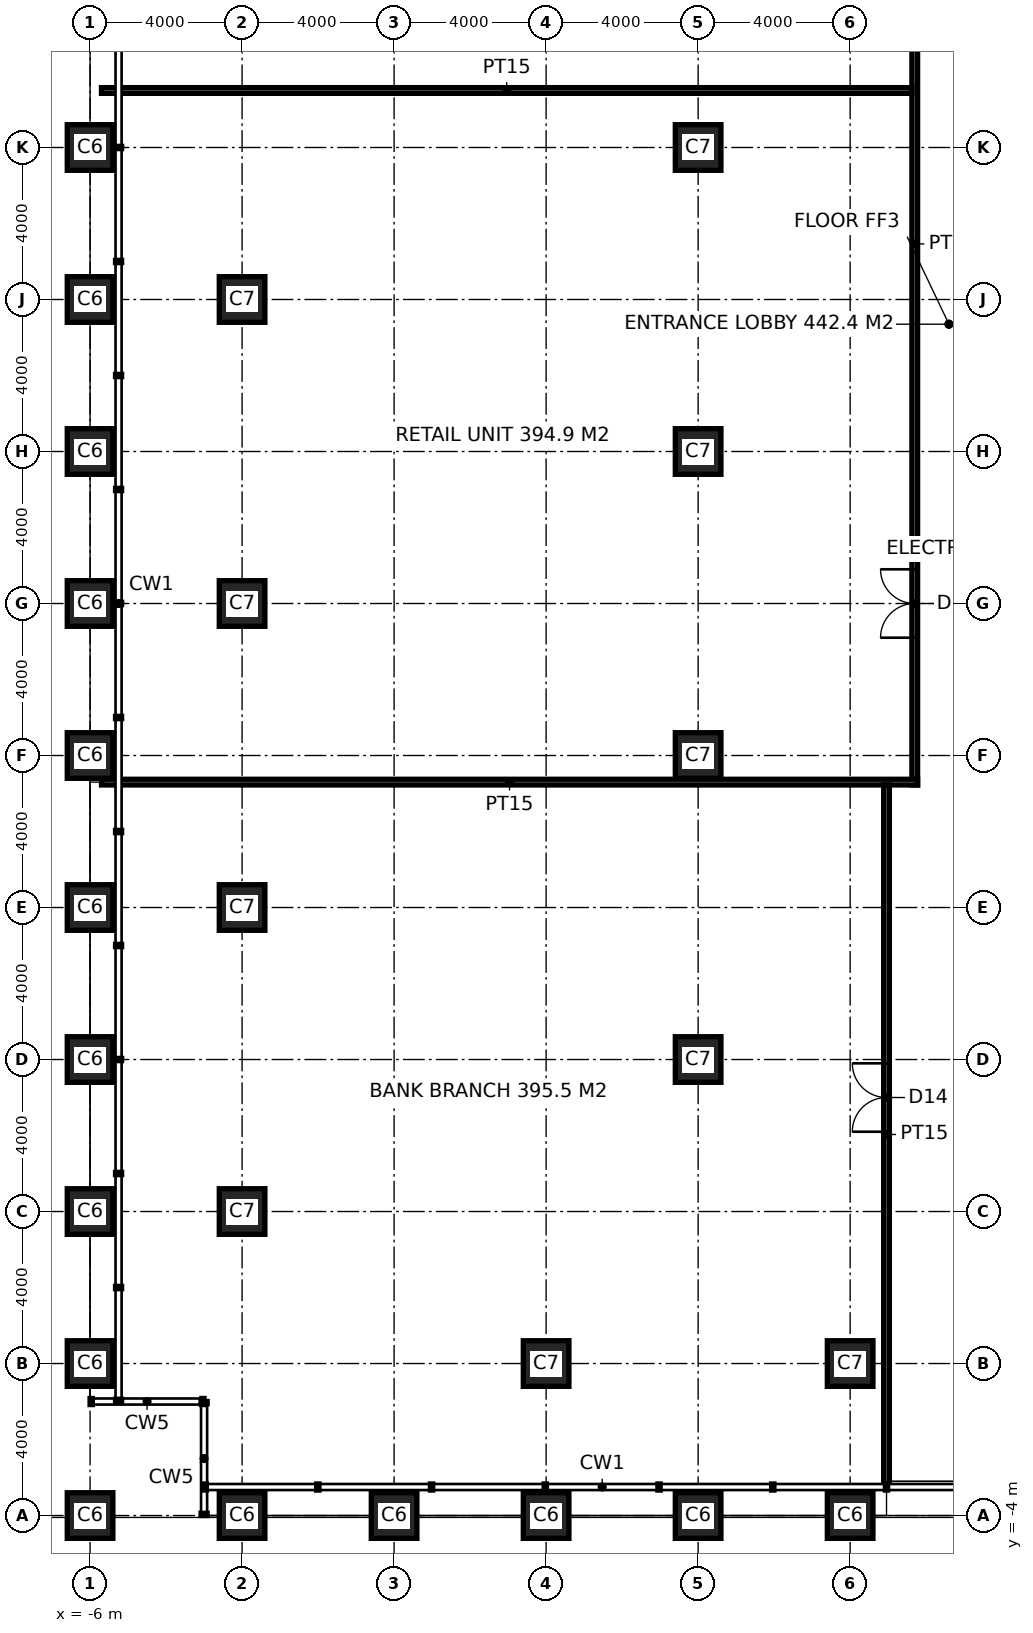
"""IFC4 building model, lengths in metres.
Left out: names, types, materials, properties, quantities, classifications, styles, units other than length and angle.
Written with IfcOpenShell. Run it as: python <this file> out.ifc"""

import sys

from ifc_helpers import new_model, si_unit, direction, frame, frame_2d, origin, origin_2d, place, context, subcontext, project, spatial, rectangle, hollow_rectangle, extrude, element, fill, save


model = new_model("IFC4")
c1 = context("Model", 3, precision=1e-05, world=origin(), true_north=direction((0.0, 1.0)))
c2 = subcontext(c1, "Body", "Model", "MODEL_VIEW")
j1 = project(units=[si_unit("LENGTHUNIT", "METRE"), si_unit("PLANEANGLEUNIT", "RADIAN")], contexts=[c1])
p1 = place(None, origin())
s1 = spatial("IfcSite", under=j1, at=p1, CompositionType="ELEMENT")
p2 = place(p1, origin())
s2 = spatial("IfcBuilding", under=s1, at=p2, CompositionType="ELEMENT")
p3 = place(p2, origin())
s3 = spatial("IfcBuildingStorey", under=s2, at=p3, CompositionType="ELEMENT", Elevation=0.0)
for number, where, z_axis, x_axis in (
    (1, (-6.0, -4.0, -0.3), (0.0, 0.0, 1.0), (1.0, 0.0, 0.0)),
    (2, (-6.0, 0.0, -0.3), (0.0, 0.0, 1.0), (1.0, 0.0, 0.0)),
    (3, (-6.0, 4.0, -0.3), (0.0, 0.0, 1.0), (1.0, 0.0, 0.0)),
    (4, (-6.0, 8.0, -0.3), (0.0, 0.0, 1.0), (1.0, 0.0, 0.0)),
    (5, (-6.0, 12.0, -0.3), (0.0, 0.0, 1.0), (1.0, 0.0, 0.0)),
    (6, (-6.0, 16.0, -0.3), (0.0, 0.0, 1.0), (1.0, 0.0, 0.0)),
    (7, (-6.0, 20.0, -0.3), (0.0, 0.0, 1.0), (1.0, 0.0, 0.0)),
    (8, (-6.0, 24.0, -0.3), (0.0, 0.0, 1.0), (1.0, 0.0, 0.0)),
    (9, (-6.0, 28.0, -0.3), (0.0, 0.0, 1.0), (1.0, 0.0, 0.0)),
    (10, (-6.0, 32.0, -0.3), (0.0, 0.0, 1.0), (1.0, 0.0, 0.0)),
    (11, (-2.0, -4.0, -0.3), (0.0, 0.0, 1.0), (1.0, 0.0, 0.0)),
    (12, (2.0, -4.0, -0.3), (0.0, 0.0, 1.0), (1.0, 0.0, 0.0)),
    (13, (6.0, -4.0, -0.3), (0.0, 0.0, 1.0), (1.0, 0.0, 0.0)),
    (14, (10.0, -4.0, -0.3), (0.0, 0.0, 1.0), (1.0, 0.0, 0.0)),
    (15, (14.0, -4.0, -0.3), (0.0, 0.0, 1.0), (1.0, 0.0, 0.0)),
):
    element("IfcColumn", number, at=place(p3, frame(where, z_axis=z_axis, x_axis=x_axis)), inside=s3, PredefinedType="COLUMN", context=c2, shape_type="SweptSolid", body=[
        extrude(hollow_rectangle(XDim=1.2, YDim=1.2, WallThickness=0.125, at=origin_2d()), origin(), (0.0, 0.0, 1.0), 6.3),
    ])
for number, where, z_axis, x_axis in (
    (16, (-2.0, 4.0, -0.3), (0.0, 0.0, 1.0), (1.0, 0.0, 0.0)),
    (17, (-2.0, 12.0, -0.3), (0.0, 0.0, 1.0), (1.0, 0.0, 0.0)),
    (18, (-2.0, 20.0, -0.3), (0.0, 0.0, 1.0), (1.0, 0.0, 0.0)),
    (19, (-2.0, 28.0, -0.3), (0.0, 0.0, 1.0), (1.0, 0.0, 0.0)),
    (20, (6.0, 0.0, -0.3), (0.0, 0.0, 1.0), (1.0, 0.0, 0.0)),
    (21, (10.0, 8.0, -0.3), (0.0, 0.0, 1.0), (1.0, 0.0, 0.0)),
    (22, (10.0, 16.0, -0.3), (0.0, 0.0, 1.0), (1.0, 0.0, 0.0)),
    (23, (10.0, 24.0, -0.3), (0.0, 0.0, 1.0), (1.0, 0.0, 0.0)),
    (24, (10.0, 32.0, -0.3), (0.0, 0.0, 1.0), (1.0, 0.0, 0.0)),
    (25, (14.0, 0.0, -0.3), (0.0, 0.0, 1.0), (1.0, 0.0, 0.0)),
):
    element("IfcColumn", number, at=place(p3, frame(where, z_axis=z_axis, x_axis=x_axis)), inside=s3, PredefinedType="COLUMN", context=c2, shape_type="SweptSolid", body=[
        extrude(hollow_rectangle(XDim=1.2, YDim=1.2, WallThickness=0.1, at=origin_2d()), origin(), (0.0, 0.0, 1.0), 6.3),
    ])
p4 = place(p3, frame((15.7, 15.225, 0.0), z_axis=(0.0, 0.0, 1.0), x_axis=(0.0, 1.0, 0.0)))
e26 = element("IfcWall", 26, at=p4, inside=s3, PredefinedType="PARTITIONING", context=c2, shape_type="SweptSolid", body=[
    extrude(rectangle(XDim=28.475, YDim=0.15, at=frame_2d((14.237, 0.0))), origin(), (0.0, 0.0, 1.0), 5.85),
])
p5 = place(p4, frame((3.875, 0.0, 0.0)))
e27 = element("IfcOpeningElement", 27, at=p5, cuts=e26, PredefinedType="OPENING", context=c2, shape_type="SweptSolid", body=[
    extrude(rectangle(XDim=1.8, YDim=2.7, at=frame_2d((0.9, 1.35))), frame((0.0, 0.085, 0.0), z_axis=(0.0, -1.0, 0.0), x_axis=(1.0, 0.0, 0.0)), (0.0, 0.0, 1.0), 0.17),
])
p6 = place(p4, frame((22.075, 0.0, 0.0)))
e28 = element("IfcOpeningElement", 28, at=p6, cuts=e26, PredefinedType="OPENING", context=c2, shape_type="SweptSolid", body=[
    extrude(rectangle(XDim=2.4, YDim=2.7, at=frame_2d((1.2, 1.35))), frame((0.0, 0.085, 0.0), z_axis=(0.0, -1.0, 0.0), x_axis=(1.0, 0.0, 0.0)), (0.0, 0.0, 1.0), 0.17),
])
p7 = place(p3, frame((-5.7, 15.3, 0.0), z_axis=(0.0, 0.0, 1.0), x_axis=(1.0, 0.0, 0.0)))
e29 = element("IfcWall", 29, at=p7, inside=s3, PredefinedType="PARTITIONING", context=c2, shape_type="SweptSolid", body=[
    extrude(rectangle(XDim=21.475, YDim=0.15, at=frame_2d((10.737, 0.0))), origin(), (0.0, 0.0, 1.0), 5.85),
])
p8 = place(p3, frame((-5.7, 33.5, 0.0), z_axis=(0.0, 0.0, 1.0), x_axis=(1.0, 0.0, 0.0)))
e30 = element("IfcWall", 30, at=p8, inside=s3, PredefinedType="PARTITIONING", context=c2, shape_type="SweptSolid", body=[
    extrude(rectangle(XDim=21.325, YDim=0.15, at=frame_2d((10.663, 0.0))), origin(), (0.0, 0.0, 1.0), 5.85),
])
p9 = place(p3, frame((14.957, -3.17, 0.0), z_axis=(0.0, 0.0, 1.0), x_axis=(0.0, 1.0, 0.0)))
e31 = element("IfcWall", 31, at=p9, inside=s3, PredefinedType="PARTITIONING", context=c2, shape_type="SweptSolid", body=[
    extrude(rectangle(XDim=18.395, YDim=0.15, at=frame_2d((9.198, 0.0))), origin(), (0.0, 0.0, 1.0), 5.85),
])
p10 = place(p9, frame((9.27, 0.0, 0.0)))
e32 = element("IfcOpeningElement", 32, at=p10, cuts=e31, PredefinedType="OPENING", context=c2, shape_type="SweptSolid", body=[
    extrude(rectangle(XDim=1.8, YDim=2.7, at=frame_2d((0.9, 1.35))), frame((0.0, 0.085, 0.0), z_axis=(0.0, -1.0, 0.0), x_axis=(1.0, 0.0, 0.0)), (0.0, 0.0, 1.0), 0.17),
])
p11 = place(p5, origin())
e33 = element("IfcDoor", 33, at=p11, inside=s3, OperationType="DOUBLE_DOOR_DOUBLE_SWING", PredefinedType="DOOR", context=c2, shape_type="SweptSolid", body=[
    extrude(rectangle(XDim=1.8, YDim=2.7, at=frame_2d((0.9, 1.35))), frame((0.0, 0.025, 0.0), z_axis=(0.0, -1.0, 0.0), x_axis=(1.0, 0.0, 0.0)), (0.0, 0.0, 1.0), 0.05),
])
fill(e27, e33)
p12 = place(p10, origin())
e34 = element("IfcDoor", 34, at=p12, inside=s3, OperationType="DOUBLE_DOOR_DOUBLE_SWING", PredefinedType="DOOR", context=c2, shape_type="SweptSolid", body=[
    extrude(rectangle(XDim=1.8, YDim=2.7, at=frame_2d((0.9, 1.35))), frame((0.0, 0.025, 0.0), z_axis=(0.0, -1.0, 0.0), x_axis=(1.0, 0.0, 0.0)), (0.0, 0.0, 1.0), 0.05),
])
fill(e32, e34)
save(model, sys.argv[1])
